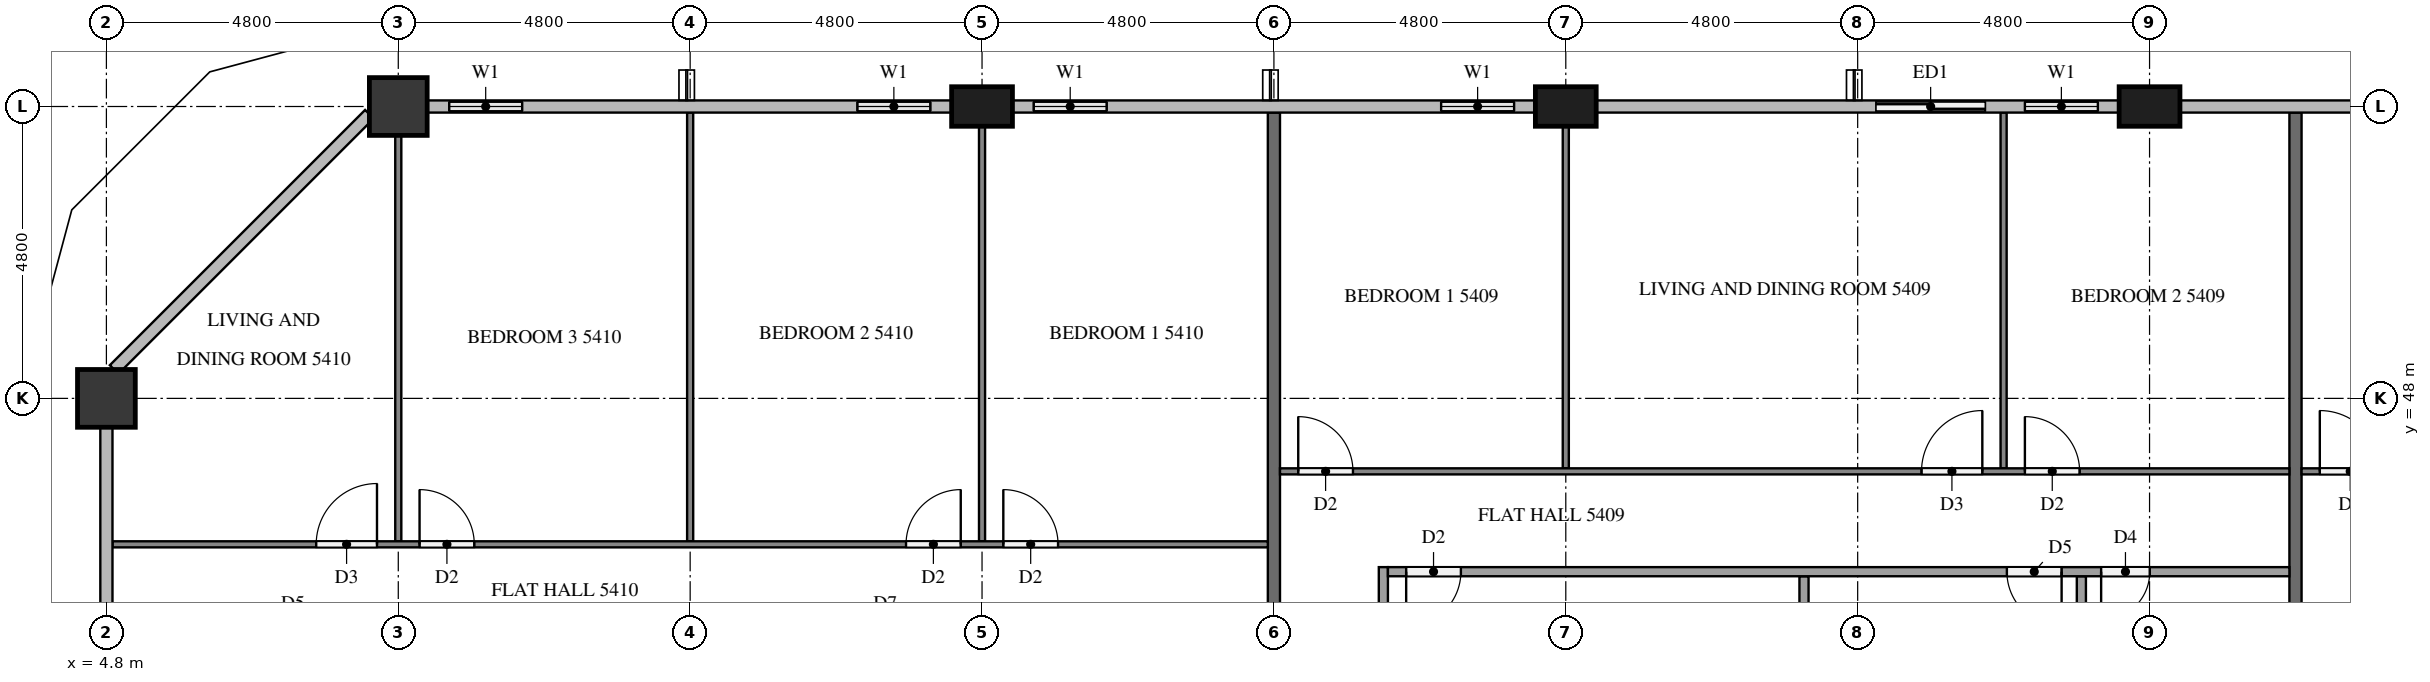
"""IFC4 building model, lengths in metres.
Left out: names, types, materials, properties, quantities, classifications, styles, units other than length and angle.
Written with IfcOpenShell. Run it as: python <this file> out.ifc"""

import sys

from ifc_helpers import new_model, si_unit, direction, frame, frame_2d, origin, origin_2d, place, context, subcontext, project, spatial, rectangle, extrude, element, fill, save


model = new_model("IFC4")
c1 = context("Model", 3, precision=1e-05, world=origin(), true_north=direction((0.0, 1.0)))
c2 = subcontext(c1, "Body", "Model", "MODEL_VIEW")
j1 = project(units=[si_unit("LENGTHUNIT", "METRE"), si_unit("PLANEANGLEUNIT", "RADIAN")], contexts=[c1])
p1 = place(None, origin())
s1 = spatial("IfcSite", under=j1, at=p1, CompositionType="ELEMENT")
p2 = place(p1, origin())
s2 = spatial("IfcBuilding", under=s1, at=p2, CompositionType="ELEMENT")
p3 = place(p2, frame((0.0, 0.0, 208.8)))
s3 = spatial("IfcBuildingStorey", under=s2, at=p3, CompositionType="ELEMENT", Elevation=208.8)
for number, where, z_axis, x_axis in (
    (1, (38.4, 52.8, 0.0), (0.0, 0.0, 1.0), (1.0, 0.0, 0.0)),
    (2, (28.8, 52.8, 0.0), (0.0, 0.0, 1.0), (1.0, 0.0, 0.0)),
    (3, (19.2, 52.8, 0.0), (0.0, 0.0, 1.0), (1.0, 0.0, 0.0)),
):
    element("IfcColumn", number, at=place(p3, frame(where, z_axis=z_axis, x_axis=x_axis)), inside=s3, PredefinedType="COLUMN", context=c2, shape_type="SweptSolid", body=[
        extrude(rectangle(XDim=1.0, YDim=0.65, at=origin_2d()), origin(), (0.0, 0.0, 1.0), 3.2),
    ])
for number, where, z_axis, x_axis in (
    (4, (9.6, 52.8, 0.0), (0.0, 0.0, 1.0), (1.0, 0.0, 0.0)),
    (5, (4.8, 48.0, 0.0), (0.0, 0.0, 1.0), (1.0, 0.0, 0.0)),
):
    element("IfcColumn", number, at=place(p3, frame(where, z_axis=z_axis, x_axis=x_axis)), inside=s3, PredefinedType="COLUMN", context=c2, shape_type="SweptSolid", body=[
        extrude(rectangle(XDim=0.95, YDim=0.95, at=origin_2d()), origin(), (0.0, 0.0, 1.0), 3.2),
    ])
p4 = place(p3, frame((37.9, 52.8, 0.0), z_axis=(0.0, 0.0, 1.0), x_axis=(-1.0, 0.0, 0.0)))
e6 = element("IfcWall", 6, at=p4, inside=s3, PredefinedType="SOLIDWALL", context=c2, shape_type="SweptSolid", body=[
    extrude(rectangle(XDim=4.3, YDim=0.15, at=frame_2d((2.15, 0.0))), origin(), (0.0, 0.0, 1.0), 3.2),
])
p5 = place(p4, frame((0.35, 0.0, 0.9)))
e7 = element("IfcOpeningElement", 7, at=p5, cuts=e6, PredefinedType="OPENING", context=c2, shape_type="SweptSolid", body=[
    extrude(rectangle(XDim=1.2, YDim=1.4, at=frame_2d((0.6, 0.7))), frame((0.0, 0.085, 0.0), z_axis=(0.0, -1.0, 0.0), x_axis=(1.0, 0.0, 0.0)), (0.0, 0.0, 1.0), 0.17),
])
p6 = place(p4, frame((2.2, 0.0, 0.0)))
e8 = element("IfcOpeningElement", 8, at=p6, cuts=e6, PredefinedType="OPENING", context=c2, shape_type="SweptSolid", body=[
    extrude(rectangle(XDim=1.8, YDim=2.4, at=frame_2d((0.9, 1.2))), frame((0.0, 0.085, 0.0), z_axis=(0.0, -1.0, 0.0), x_axis=(1.0, 0.0, 0.0)), (0.0, 0.0, 1.0), 0.17),
])
p7 = place(p3, frame((28.3, 52.8, 0.0), z_axis=(0.0, 0.0, 1.0), x_axis=(-1.0, 0.0, 0.0)))
e9 = element("IfcWall", 9, at=p7, inside=s3, PredefinedType="SOLIDWALL", context=c2, shape_type="SweptSolid", body=[
    extrude(rectangle(XDim=1.9, YDim=0.15, at=frame_2d((0.95, 0.0))), origin(), (0.0, 0.0, 1.0), 3.2),
])
p8 = place(p7, frame((0.35, 0.0, 0.9)))
e10 = element("IfcOpeningElement", 10, at=p8, cuts=e9, PredefinedType="OPENING", context=c2, shape_type="SweptSolid", body=[
    extrude(rectangle(XDim=1.2, YDim=1.4, at=frame_2d((0.6, 0.7))), frame((0.0, 0.085, 0.0), z_axis=(0.0, -1.0, 0.0), x_axis=(1.0, 0.0, 0.0)), (0.0, 0.0, 1.0), 0.17),
])
p9 = place(p3, frame((21.6, 52.8, 0.0), z_axis=(0.0, 0.0, 1.0), x_axis=(-1.0, 0.0, 0.0)))
e11 = element("IfcWall", 11, at=p9, inside=s3, PredefinedType="SOLIDWALL", context=c2, shape_type="SweptSolid", body=[
    extrude(rectangle(XDim=1.9, YDim=0.15, at=frame_2d((0.95, 0.0))), origin(), (0.0, 0.0, 1.0), 3.2),
])
p10 = place(p9, frame((0.35, 0.0, 0.9)))
e12 = element("IfcOpeningElement", 12, at=p10, cuts=e11, PredefinedType="OPENING", context=c2, shape_type="SweptSolid", body=[
    extrude(rectangle(XDim=1.2, YDim=1.4, at=frame_2d((0.6, 0.7))), frame((0.0, 0.085, 0.0), z_axis=(0.0, -1.0, 0.0), x_axis=(1.0, 0.0, 0.0)), (0.0, 0.0, 1.0), 0.17),
])
p11 = place(p3, frame((18.7, 52.8, 0.0), z_axis=(0.0, 0.0, 1.0), x_axis=(-1.0, 0.0, 0.0)))
e13 = element("IfcWall", 13, at=p11, inside=s3, PredefinedType="SOLIDWALL", context=c2, shape_type="SweptSolid", body=[
    extrude(rectangle(XDim=1.9, YDim=0.15, at=frame_2d((0.95, 0.0))), origin(), (0.0, 0.0, 1.0), 3.2),
])
p12 = place(p11, frame((0.35, 0.0, 0.9)))
e14 = element("IfcOpeningElement", 14, at=p12, cuts=e13, PredefinedType="OPENING", context=c2, shape_type="SweptSolid", body=[
    extrude(rectangle(XDim=1.2, YDim=1.4, at=frame_2d((0.6, 0.7))), frame((0.0, 0.085, 0.0), z_axis=(0.0, -1.0, 0.0), x_axis=(1.0, 0.0, 0.0)), (0.0, 0.0, 1.0), 0.17),
])
p13 = place(p3, frame((12.0, 52.8, 0.0), z_axis=(0.0, 0.0, 1.0), x_axis=(-1.0, 0.0, 0.0)))
e15 = element("IfcWall", 15, at=p13, inside=s3, PredefinedType="SOLIDWALL", context=c2, shape_type="SweptSolid", body=[
    extrude(rectangle(XDim=1.925, YDim=0.15, at=frame_2d((0.962, 0.0))), origin(), (0.0, 0.0, 1.0), 3.2),
])
p14 = place(p13, frame((0.363, 0.0, 0.9)))
e16 = element("IfcOpeningElement", 16, at=p14, cuts=e15, PredefinedType="OPENING", context=c2, shape_type="SweptSolid", body=[
    extrude(rectangle(XDim=1.2, YDim=1.4, at=frame_2d((0.6, 0.7))), frame((0.0, 0.085, 0.0), z_axis=(0.0, -1.0, 0.0), x_axis=(1.0, 0.0, 0.0)), (0.0, 0.0, 1.0), 0.17),
])
for number, where, z_axis, x_axis in (
    (17, (40.8, 52.7, 0.0), (0.0, 0.0, 1.0), (0.0, -1.0, 0.0)),
    (18, (24.0, 52.7, 0.0), (0.0, 0.0, 1.0), (0.0, -1.0, 0.0)),
):
    element("IfcWall", number, at=place(p3, frame(where, z_axis=z_axis, x_axis=x_axis)), inside=s3, PredefinedType="PARTITIONING", context=c2, shape_type="SweptSolid", body=[
        extrude(rectangle(XDim=11.8, YDim=0.2, at=frame_2d((5.9, 0.0))), origin(), (0.0, 0.0, 1.0), 3.2),
    ])
p15 = place(p3, frame((40.9, 46.8, 0.0), z_axis=(0.0, 0.0, 1.0), x_axis=(1.0, 0.0, 0.0)))
e19 = element("IfcWall", 19, at=p15, inside=s3, PredefinedType="PARTITIONING", context=c2, shape_type="SweptSolid", body=[
    extrude(rectangle(XDim=7.0, YDim=0.1, at=frame_2d((3.5, 0.0))), origin(), (0.0, 0.0, 1.0), 3.2),
])
p16 = place(p15, frame((0.3, 0.0, 0.0)))
e20 = element("IfcOpeningElement", 20, at=p16, cuts=e19, PredefinedType="OPENING", context=c2, shape_type="SweptSolid", body=[
    extrude(rectangle(XDim=1.0, YDim=2.1, at=frame_2d((0.5, 1.05))), frame((0.0, 0.06, 0.0), z_axis=(0.0, -1.0, 0.0), x_axis=(1.0, 0.0, 0.0)), (0.0, 0.0, 1.0), 0.12),
])
p17 = place(p3, frame((28.8, 46.85, 0.0), z_axis=(0.0, 0.0, 1.0), x_axis=(0.0, 1.0, 0.0)))
e21 = element("IfcWall", 21, at=p17, inside=s3, PredefinedType="PARTITIONING", context=c2, shape_type="SweptSolid", body=[
    extrude(rectangle(XDim=5.625, YDim=0.1, at=frame_2d((2.812, 0.0))), origin(), (0.0, 0.0, 1.0), 3.2),
])
p18 = place(p3, frame((36.0, 46.85, 0.0), z_axis=(0.0, 0.0, 1.0), x_axis=(0.0, 1.0, 0.0)))
e22 = element("IfcWall", 22, at=p18, inside=s3, PredefinedType="PARTITIONING", context=c2, shape_type="SweptSolid", body=[
    extrude(rectangle(XDim=5.85, YDim=0.1, at=frame_2d((2.925, 0.0))), origin(), (0.0, 0.0, 1.0), 3.2),
])
p19 = place(p3, frame((24.1, 46.8, 0.0), z_axis=(0.0, 0.0, 1.0), x_axis=(1.0, 0.0, 0.0)))
e23 = element("IfcWall", 23, at=p19, inside=s3, PredefinedType="PARTITIONING", context=c2, shape_type="SweptSolid", body=[
    extrude(rectangle(XDim=16.6, YDim=0.1, at=frame_2d((8.3, 0.0))), origin(), (0.0, 0.0, 1.0), 3.2),
])
p20 = place(p19, frame((0.3, 0.0, 0.0)))
e24 = element("IfcOpeningElement", 24, at=p20, cuts=e23, PredefinedType="OPENING", context=c2, shape_type="SweptSolid", body=[
    extrude(rectangle(XDim=0.9, YDim=2.1, at=frame_2d((0.45, 1.05))), frame((0.0, 0.06, 0.0), z_axis=(0.0, -1.0, 0.0), x_axis=(1.0, 0.0, 0.0)), (0.0, 0.0, 1.0), 0.12),
])
p21 = place(p19, frame((10.55, 0.0, 0.0)))
e25 = element("IfcOpeningElement", 25, at=p21, cuts=e23, PredefinedType="OPENING", context=c2, shape_type="SweptSolid", body=[
    extrude(rectangle(XDim=1.0, YDim=2.1, at=frame_2d((0.5, 1.05))), frame((0.0, 0.06, 0.0), z_axis=(0.0, -1.0, 0.0), x_axis=(1.0, 0.0, 0.0)), (0.0, 0.0, 1.0), 0.12),
])
p22 = place(p19, frame((12.25, 0.0, 0.0)))
e26 = element("IfcOpeningElement", 26, at=p22, cuts=e23, PredefinedType="OPENING", context=c2, shape_type="SweptSolid", body=[
    extrude(rectangle(XDim=0.9, YDim=2.1, at=frame_2d((0.45, 1.05))), frame((0.0, 0.06, 0.0), z_axis=(0.0, -1.0, 0.0), x_axis=(1.0, 0.0, 0.0)), (0.0, 0.0, 1.0), 0.12),
])
for number, where, z_axis, x_axis in (
    (27, (32.717, 40.9, 0.0), (0.0, 0.0, 1.0), (0.0, 1.0, 0.0)),
    (28, (37.279, 40.9, 0.0), (0.0, 0.0, 1.0), (0.0, 1.0, 0.0)),
):
    element("IfcWall", number, at=place(p3, frame(where, z_axis=z_axis, x_axis=x_axis)), inside=s3, PredefinedType="PARTITIONING", context=c2, shape_type="SweptSolid", body=[
        extrude(rectangle(XDim=4.175, YDim=0.15, at=frame_2d((2.087, 0.0))), origin(), (0.0, 0.0, 1.0), 3.2),
    ])
p23 = place(p3, frame((25.8, 40.9, 0.0), z_axis=(0.0, 0.0, 1.0), x_axis=(0.0, 1.0, 0.0)))
e29 = element("IfcWall", 29, at=p23, inside=s3, PredefinedType="PARTITIONING", context=c2, shape_type="SweptSolid", body=[
    extrude(rectangle(XDim=4.325, YDim=0.15, at=frame_2d((2.163, 0.0))), origin(), (0.0, 0.0, 1.0), 3.2),
])
p24 = place(p3, frame((40.7, 45.15, 0.0), z_axis=(0.0, 0.0, 1.0), x_axis=(-1.0, 0.0, 0.0)))
e30 = element("IfcWall", 30, at=p24, inside=s3, PredefinedType="PARTITIONING", context=c2, shape_type="SweptSolid", body=[
    extrude(rectangle(XDim=14.825, YDim=0.15, at=frame_2d((7.413, 0.0))), origin(), (0.0, 0.0, 1.0), 3.2),
])
p25 = place(p24, frame((13.625, 0.0, 0.0)))
e31 = element("IfcOpeningElement", 31, at=p25, cuts=e30, PredefinedType="OPENING", context=c2, shape_type="SweptSolid", body=[
    extrude(rectangle(XDim=0.9, YDim=2.1, at=frame_2d((0.45, 1.05))), frame((0.0, 0.085, 0.0), z_axis=(0.0, -1.0, 0.0), x_axis=(1.0, 0.0, 0.0)), (0.0, 0.0, 1.0), 0.17),
])
p26 = place(p24, frame((3.746, 0.0, 0.0)))
e32 = element("IfcOpeningElement", 32, at=p26, cuts=e30, PredefinedType="OPENING", context=c2, shape_type="SweptSolid", body=[
    extrude(rectangle(XDim=0.9, YDim=2.1, at=frame_2d((0.45, 1.05))), frame((0.0, 0.085, 0.0), z_axis=(0.0, -1.0, 0.0), x_axis=(1.0, 0.0, 0.0)), (0.0, 0.0, 1.0), 0.17),
])
p27 = place(p24, frame((2.296, 0.0, 0.0)))
e33 = element("IfcOpeningElement", 33, at=p27, cuts=e30, PredefinedType="OPENING", context=c2, shape_type="SweptSolid", body=[
    extrude(rectangle(XDim=0.8, YDim=2.1, at=frame_2d((0.4, 1.05))), frame((0.0, 0.085, 0.0), z_axis=(0.0, -1.0, 0.0), x_axis=(1.0, 0.0, 0.0)), (0.0, 0.0, 1.0), 0.17),
])
p28 = place(p3, frame((19.2, 45.65, 0.0), z_axis=(0.0, 0.0, 1.0), x_axis=(0.0, 1.0, 0.0)))
e34 = element("IfcWall", 34, at=p28, inside=s3, PredefinedType="PARTITIONING", context=c2, shape_type="SweptSolid", body=[
    extrude(rectangle(XDim=6.825, YDim=0.1, at=frame_2d((3.413, 0.0))), origin(), (0.0, 0.0, 1.0), 3.2),
])
p29 = place(p3, frame((14.4, 45.65, 0.0), z_axis=(0.0, 0.0, 1.0), x_axis=(0.0, 1.0, 0.0)))
e35 = element("IfcWall", 35, at=p29, inside=s3, PredefinedType="PARTITIONING", context=c2, shape_type="SweptSolid", body=[
    extrude(rectangle(XDim=7.05, YDim=0.1, at=frame_2d((3.525, 0.0))), origin(), (0.0, 0.0, 1.0), 3.2),
])
p30 = place(p3, frame((9.6, 45.65, 0.0), z_axis=(0.0, 0.0, 1.0), x_axis=(0.0, 1.0, 0.0)))
e36 = element("IfcWall", 36, at=p30, inside=s3, PredefinedType="PARTITIONING", context=c2, shape_type="SweptSolid", body=[
    extrude(rectangle(XDim=6.675, YDim=0.1, at=frame_2d((3.337, 0.0))), origin(), (0.0, 0.0, 1.0), 3.2),
])
p31 = place(p3, frame((4.9, 45.6, 0.0), z_axis=(0.0, 0.0, 1.0), x_axis=(1.0, 0.0, 0.0)))
e37 = element("IfcWall", 37, at=p31, inside=s3, PredefinedType="PARTITIONING", context=c2, shape_type="SweptSolid", body=[
    extrude(rectangle(XDim=19.0, YDim=0.1, at=frame_2d((9.5, 0.0))), origin(), (0.0, 0.0, 1.0), 3.2),
])
p32 = place(p31, frame((14.65, 0.0, 0.0)))
e38 = element("IfcOpeningElement", 38, at=p32, cuts=e37, PredefinedType="OPENING", context=c2, shape_type="SweptSolid", body=[
    extrude(rectangle(XDim=0.9, YDim=2.1, at=frame_2d((0.45, 1.05))), frame((0.0, 0.06, 0.0), z_axis=(0.0, -1.0, 0.0), x_axis=(1.0, 0.0, 0.0)), (0.0, 0.0, 1.0), 0.12),
])
p33 = place(p31, frame((13.05, 0.0, 0.0)))
e39 = element("IfcOpeningElement", 39, at=p33, cuts=e37, PredefinedType="OPENING", context=c2, shape_type="SweptSolid", body=[
    extrude(rectangle(XDim=0.9, YDim=2.1, at=frame_2d((0.45, 1.05))), frame((0.0, 0.06, 0.0), z_axis=(0.0, -1.0, 0.0), x_axis=(1.0, 0.0, 0.0)), (0.0, 0.0, 1.0), 0.12),
])
p34 = place(p31, frame((5.05, 0.0, 0.0)))
e40 = element("IfcOpeningElement", 40, at=p34, cuts=e37, PredefinedType="OPENING", context=c2, shape_type="SweptSolid", body=[
    extrude(rectangle(XDim=0.9, YDim=2.1, at=frame_2d((0.45, 1.05))), frame((0.0, 0.06, 0.0), z_axis=(0.0, -1.0, 0.0), x_axis=(1.0, 0.0, 0.0)), (0.0, 0.0, 1.0), 0.12),
])
p35 = place(p31, frame((3.35, 0.0, 0.0)))
e41 = element("IfcOpeningElement", 41, at=p35, cuts=e37, PredefinedType="OPENING", context=c2, shape_type="SweptSolid", body=[
    extrude(rectangle(XDim=1.0, YDim=2.1, at=frame_2d((0.5, 1.05))), frame((0.0, 0.06, 0.0), z_axis=(0.0, -1.0, 0.0), x_axis=(1.0, 0.0, 0.0)), (0.0, 0.0, 1.0), 0.12),
])
p36 = place(p5, origin())
e42 = element("IfcWindow", 42, at=p36, inside=s3, PartitioningType="SINGLE_PANEL", PredefinedType="WINDOW", context=c2, shape_type="SweptSolid", body=[
    extrude(rectangle(XDim=1.2, YDim=1.4, at=frame_2d((0.6, 0.7))), frame((0.0, 0.03, 0.0), z_axis=(0.0, -1.0, 0.0), x_axis=(1.0, 0.0, 0.0)), (0.0, 0.0, 1.0), 0.06),
])
fill(e7, e42)
p37 = place(p6, origin())
e43 = element("IfcDoor", 43, at=p37, inside=s3, OperationType="SLIDING_TO_RIGHT", PredefinedType="DOOR", context=c2, shape_type="SweptSolid", body=[
    extrude(rectangle(XDim=1.8, YDim=2.4, at=frame_2d((0.9, 1.2))), frame((0.0, 0.025, 0.0), z_axis=(0.0, -1.0, 0.0), x_axis=(1.0, 0.0, 0.0)), (0.0, 0.0, 1.0), 0.05),
])
fill(e8, e43)
p38 = place(p8, origin())
e44 = element("IfcWindow", 44, at=p38, inside=s3, PartitioningType="SINGLE_PANEL", PredefinedType="WINDOW", context=c2, shape_type="SweptSolid", body=[
    extrude(rectangle(XDim=1.2, YDim=1.4, at=frame_2d((0.6, 0.7))), frame((0.0, 0.03, 0.0), z_axis=(0.0, -1.0, 0.0), x_axis=(1.0, 0.0, 0.0)), (0.0, 0.0, 1.0), 0.06),
])
fill(e10, e44)
p39 = place(p10, origin())
e45 = element("IfcWindow", 45, at=p39, inside=s3, PartitioningType="SINGLE_PANEL", PredefinedType="WINDOW", context=c2, shape_type="SweptSolid", body=[
    extrude(rectangle(XDim=1.2, YDim=1.4, at=frame_2d((0.6, 0.7))), frame((0.0, 0.03, 0.0), z_axis=(0.0, -1.0, 0.0), x_axis=(1.0, 0.0, 0.0)), (0.0, 0.0, 1.0), 0.06),
])
fill(e12, e45)
p40 = place(p12, origin())
e46 = element("IfcWindow", 46, at=p40, inside=s3, PartitioningType="SINGLE_PANEL", PredefinedType="WINDOW", context=c2, shape_type="SweptSolid", body=[
    extrude(rectangle(XDim=1.2, YDim=1.4, at=frame_2d((0.6, 0.7))), frame((0.0, 0.03, 0.0), z_axis=(0.0, -1.0, 0.0), x_axis=(1.0, 0.0, 0.0)), (0.0, 0.0, 1.0), 0.06),
])
fill(e14, e46)
p41 = place(p14, origin())
e47 = element("IfcWindow", 47, at=p41, inside=s3, PartitioningType="SINGLE_PANEL", PredefinedType="WINDOW", context=c2, shape_type="SweptSolid", body=[
    extrude(rectangle(XDim=1.2, YDim=1.4, at=frame_2d((0.6, 0.7))), frame((0.0, 0.03, 0.0), z_axis=(0.0, -1.0, 0.0), x_axis=(1.0, 0.0, 0.0)), (0.0, 0.0, 1.0), 0.06),
])
fill(e16, e47)
p42 = place(p16, origin())
e48 = element("IfcDoor", 48, at=p42, inside=s3, OperationType="SINGLE_SWING_LEFT", PredefinedType="DOOR", context=c2, shape_type="SweptSolid", body=[
    extrude(rectangle(XDim=1.0, YDim=2.1, at=frame_2d((0.5, 1.05))), frame((0.0, 0.025, 0.0), z_axis=(0.0, -1.0, 0.0), x_axis=(1.0, 0.0, 0.0)), (0.0, 0.0, 1.0), 0.05),
])
fill(e20, e48)
p43 = place(p20, origin())
e49 = element("IfcDoor", 49, at=p43, inside=s3, OperationType="SINGLE_SWING_LEFT", PredefinedType="DOOR", context=c2, shape_type="SweptSolid", body=[
    extrude(rectangle(XDim=0.9, YDim=2.1, at=frame_2d((0.45, 1.05))), frame((0.0, 0.025, 0.0), z_axis=(0.0, -1.0, 0.0), x_axis=(1.0, 0.0, 0.0)), (0.0, 0.0, 1.0), 0.05),
])
fill(e24, e49)
p44 = place(p21, origin())
e50 = element("IfcDoor", 50, at=p44, inside=s3, OperationType="SINGLE_SWING_RIGHT", PredefinedType="DOOR", context=c2, shape_type="SweptSolid", body=[
    extrude(rectangle(XDim=1.0, YDim=2.1, at=frame_2d((0.5, 1.05))), frame((0.0, 0.025, 0.0), z_axis=(0.0, -1.0, 0.0), x_axis=(1.0, 0.0, 0.0)), (0.0, 0.0, 1.0), 0.05),
])
fill(e25, e50)
p45 = place(p22, origin())
e51 = element("IfcDoor", 51, at=p45, inside=s3, OperationType="SINGLE_SWING_LEFT", PredefinedType="DOOR", context=c2, shape_type="SweptSolid", body=[
    extrude(rectangle(XDim=0.9, YDim=2.1, at=frame_2d((0.45, 1.05))), frame((0.0, 0.025, 0.0), z_axis=(0.0, -1.0, 0.0), x_axis=(1.0, 0.0, 0.0)), (0.0, 0.0, 1.0), 0.05),
])
fill(e26, e51)
p46 = place(p25, origin())
e52 = element("IfcDoor", 52, at=p46, inside=s3, OperationType="SINGLE_SWING_RIGHT", PredefinedType="DOOR", context=c2, shape_type="SweptSolid", body=[
    extrude(rectangle(XDim=0.9, YDim=2.1, at=frame_2d((0.45, 1.05))), frame((0.0, 0.025, 0.0), z_axis=(0.0, -1.0, 0.0), x_axis=(1.0, 0.0, 0.0)), (0.0, 0.0, 1.0), 0.05),
])
fill(e31, e52)
p47 = place(p26, origin())
e53 = element("IfcDoor", 53, at=p47, inside=s3, OperationType="SINGLE_SWING_LEFT", PredefinedType="DOOR", context=c2, shape_type="SweptSolid", body=[
    extrude(rectangle(XDim=0.9, YDim=2.1, at=frame_2d((0.45, 1.05))), frame((0.0, 0.025, 0.0), z_axis=(0.0, -1.0, 0.0), x_axis=(1.0, 0.0, 0.0)), (0.0, 0.0, 1.0), 0.05),
])
fill(e32, e53)
p48 = place(p27, origin())
e54 = element("IfcDoor", 54, at=p48, inside=s3, OperationType="SINGLE_SWING_RIGHT", PredefinedType="DOOR", context=c2, shape_type="SweptSolid", body=[
    extrude(rectangle(XDim=0.8, YDim=2.1, at=frame_2d((0.4, 1.05))), frame((0.0, 0.025, 0.0), z_axis=(0.0, -1.0, 0.0), x_axis=(1.0, 0.0, 0.0)), (0.0, 0.0, 1.0), 0.05),
])
fill(e33, e54)
p49 = place(p32, origin())
e55 = element("IfcDoor", 55, at=p49, inside=s3, OperationType="SINGLE_SWING_LEFT", PredefinedType="DOOR", context=c2, shape_type="SweptSolid", body=[
    extrude(rectangle(XDim=0.9, YDim=2.1, at=frame_2d((0.45, 1.05))), frame((0.0, 0.025, 0.0), z_axis=(0.0, -1.0, 0.0), x_axis=(1.0, 0.0, 0.0)), (0.0, 0.0, 1.0), 0.05),
])
fill(e38, e55)
p50 = place(p33, origin())
e56 = element("IfcDoor", 56, at=p50, inside=s3, OperationType="SINGLE_SWING_RIGHT", PredefinedType="DOOR", context=c2, shape_type="SweptSolid", body=[
    extrude(rectangle(XDim=0.9, YDim=2.1, at=frame_2d((0.45, 1.05))), frame((0.0, 0.025, 0.0), z_axis=(0.0, -1.0, 0.0), x_axis=(1.0, 0.0, 0.0)), (0.0, 0.0, 1.0), 0.05),
])
fill(e39, e56)
p51 = place(p34, origin())
e57 = element("IfcDoor", 57, at=p51, inside=s3, OperationType="SINGLE_SWING_LEFT", PredefinedType="DOOR", context=c2, shape_type="SweptSolid", body=[
    extrude(rectangle(XDim=0.9, YDim=2.1, at=frame_2d((0.45, 1.05))), frame((0.0, 0.025, 0.0), z_axis=(0.0, -1.0, 0.0), x_axis=(1.0, 0.0, 0.0)), (0.0, 0.0, 1.0), 0.05),
])
fill(e40, e57)
p52 = place(p35, origin())
e58 = element("IfcDoor", 58, at=p52, inside=s3, OperationType="SINGLE_SWING_RIGHT", PredefinedType="DOOR", context=c2, shape_type="SweptSolid", body=[
    extrude(rectangle(XDim=1.0, YDim=2.1, at=frame_2d((0.5, 1.05))), frame((0.0, 0.025, 0.0), z_axis=(0.0, -1.0, 0.0), x_axis=(1.0, 0.0, 0.0)), (0.0, 0.0, 1.0), 0.05),
])
fill(e41, e58)
save(model, sys.argv[1])
